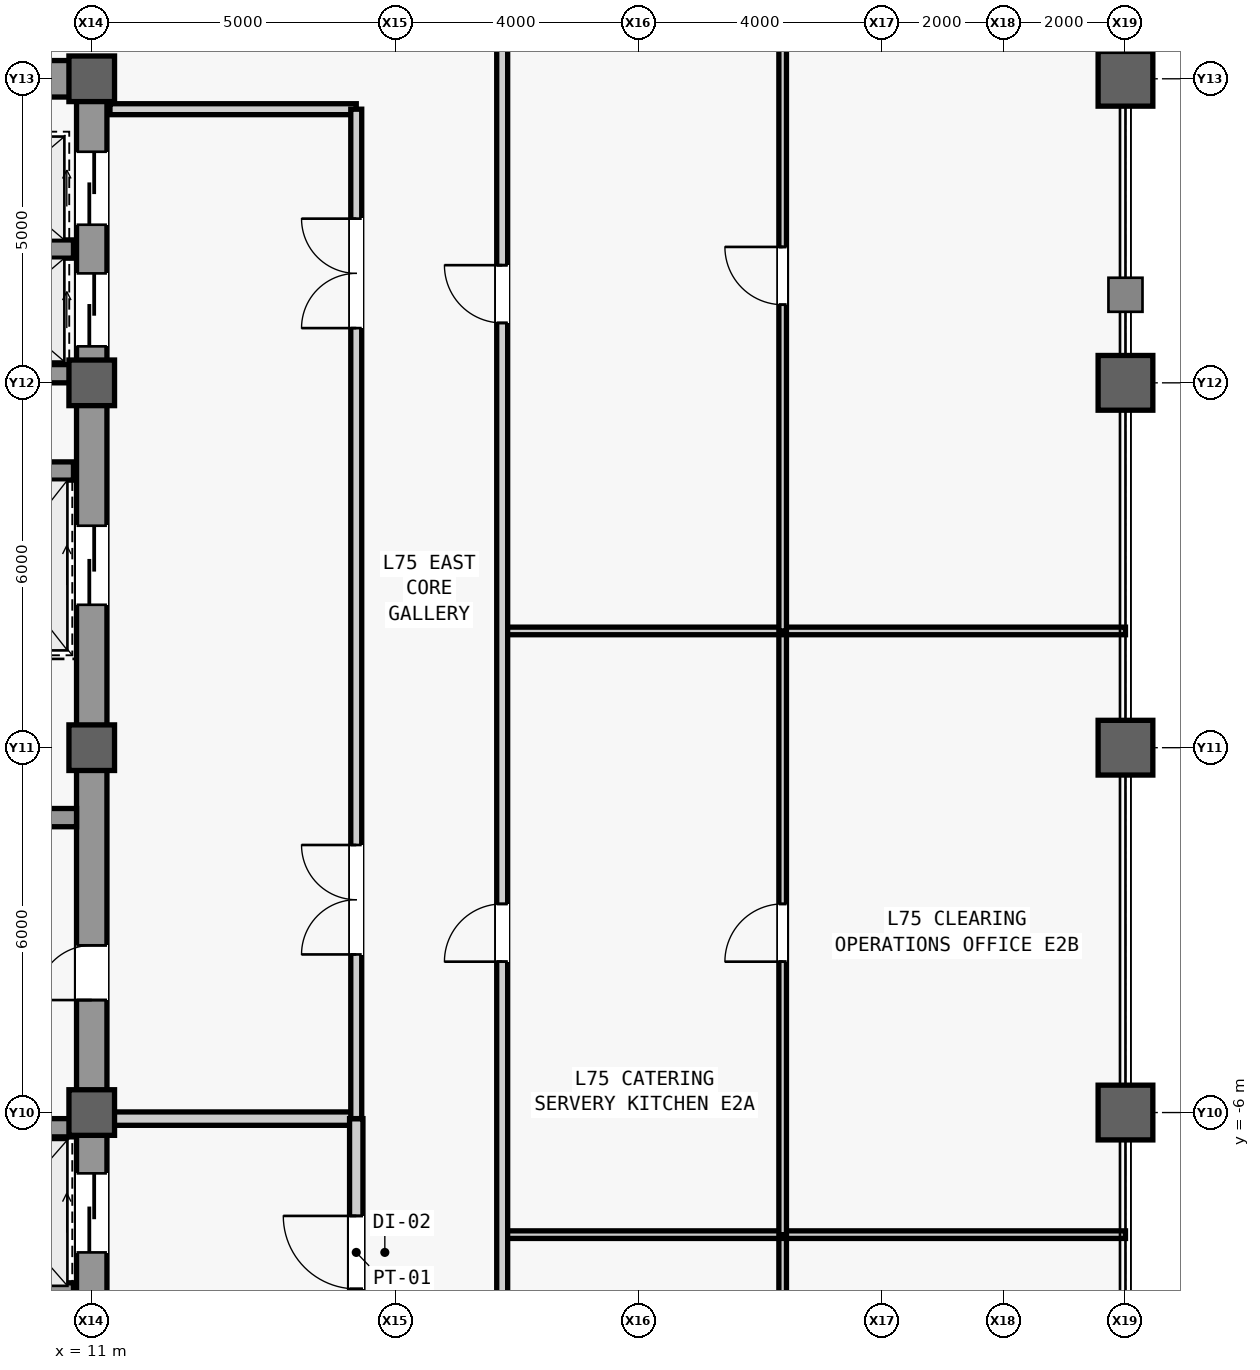
"""IFC4 building model, lengths in metres.
Left out: names, types, materials, properties, quantities, classifications, styles, units other than length and angle.
Written with IfcOpenShell. Run it as: python <this file> out.ifc"""

import sys

from ifc_helpers import new_model, si_unit, direction, frame, frame_2d, origin, origin_2d, place, context, subcontext, project, spatial, rectangle, hollow_rectangle, extrude, source, transform, mapped, element, fill, save


model = new_model("IFC4")
c1 = context("Model", 3, precision=1e-05, world=origin(), true_north=direction((0.0, 1.0)))
c2 = subcontext(c1, "Body", "Model", "MODEL_VIEW")
j1 = project(units=[si_unit("LENGTHUNIT", "METRE"), si_unit("PLANEANGLEUNIT", "RADIAN")], contexts=[c1])
p1 = place(None, origin())
s1 = spatial("IfcSite", under=j1, at=p1, CompositionType="ELEMENT")
p2 = place(p1, origin())
s2 = spatial("IfcBuilding", under=s1, at=p2, CompositionType="ELEMENT")
p3 = place(p2, frame((0.0, 0.0, 317.5)))
s3 = spatial("IfcBuildingStorey", under=s2, at=p3, CompositionType="ELEMENT", Elevation=317.5)
m1 = source(origin(), c2, "Body", "SweptSolid", [
    extrude(rectangle(XDim=22.0, YDim=0.5, at=frame_2d((11.0, 0.0))), origin(), (0.0, 0.0, 1.0), 3.78),
])
p4 = place(p3, frame((11.0, -11.0, 0.0), z_axis=(0.0, 0.0, 1.0), x_axis=(0.0, 1.0, 0.0)))
e1 = element("IfcWall", 1, at=p4, inside=s3, PredefinedType="SHEAR", context=c2, shape_type="MappedRepresentation", body=[
    mapped(m1, transform((0.0, 0.0, 0.0), scale=1.0)),
])
m2 = source(origin(), c2, "Body", "SweptSolid", [
    extrude(rectangle(XDim=1.1, YDim=2.2, at=frame_2d((0.55, 1.1))), frame((0.0, 0.26, 0.0), z_axis=(0.0, -1.0, 0.0), x_axis=(1.0, 0.0, 0.0)), (0.0, 0.0, 1.0), 0.52),
])
p5 = place(p4, frame((0.8, 0.0, 0.0)))
e2 = element("IfcOpeningElement", 2, at=p5, cuts=e1, PredefinedType="OPENING", context=c2, shape_type="MappedRepresentation", body=[
    mapped(m2, transform((0.0, 0.0, 0.0), scale=1.0)),
])
m3 = source(origin(), c2, "Body", "SweptSolid", [
    extrude(rectangle(XDim=0.9, YDim=2.15, at=frame_2d((0.45, 1.075))), frame((0.0, 0.26, 0.0), z_axis=(0.0, -1.0, 0.0), x_axis=(1.0, 0.0, 0.0)), (0.0, 0.0, 1.0), 0.52),
])
p6 = place(p4, frame((6.85, 0.0, 0.0)))
e3 = element("IfcOpeningElement", 3, at=p6, cuts=e1, PredefinedType="OPENING", context=c2, shape_type="MappedRepresentation", body=[
    mapped(m3, transform((0.0, 0.0, 0.0), scale=1.0)),
])
m4 = source(origin(), c2, "Body", "SweptSolid", [
    extrude(rectangle(XDim=1.2, YDim=2.3, at=frame_2d((0.6, 1.15))), frame((0.0, 0.26, 0.0), z_axis=(0.0, -1.0, 0.0), x_axis=(1.0, 0.0, 0.0)), (0.0, 0.0, 1.0), 0.52),
])
p7 = place(p4, frame((17.6, 0.0, 0.0)))
e4 = element("IfcOpeningElement", 4, at=p7, cuts=e1, PredefinedType="OPENING", context=c2, shape_type="MappedRepresentation", body=[
    mapped(m4, transform((0.0, 0.0, 0.0), scale=1.0)),
])
p8 = place(p4, frame((19.6, 0.0, 0.0)))
e5 = element("IfcOpeningElement", 5, at=p8, cuts=e1, PredefinedType="OPENING", context=c2, shape_type="MappedRepresentation", body=[
    mapped(m4, transform((0.0, 0.0, 0.0), scale=1.0)),
])
m5 = source(origin(), c2, "Body", "SweptSolid", [
    extrude(rectangle(XDim=1.3, YDim=2.3, at=frame_2d((0.65, 1.15))), frame((0.0, 0.26, 0.0), z_axis=(0.0, -1.0, 0.0), x_axis=(1.0, 0.0, 0.0)), (0.0, 0.0, 1.0), 0.52),
])
p9 = place(p4, frame((2.7, 0.0, 0.0)))
e6 = element("IfcOpeningElement", 6, at=p9, cuts=e1, PredefinedType="OPENING", context=c2, shape_type="MappedRepresentation", body=[
    mapped(m5, transform((0.0, 0.0, 0.0), scale=1.0)),
])
p10 = place(p4, frame((13.35, 0.0, 0.0)))
e7 = element("IfcOpeningElement", 7, at=p10, cuts=e1, PredefinedType="OPENING", context=c2, shape_type="MappedRepresentation", body=[
    mapped(m5, transform((0.0, 0.0, 0.0), scale=1.0)),
])
m6 = source(origin(), c2, "Body", "SweptSolid", [
    extrude(rectangle(XDim=5.9, YDim=0.6, at=frame_2d((2.95, 0.0))), origin(), (0.0, 0.0, 1.0), 3.78),
])
p11 = place(p3, frame((4.85, 11.0, 0.0), z_axis=(0.0, 0.0, 1.0), x_axis=(1.0, 0.0, 0.0)))
e8 = element("IfcWall", 8, at=p11, inside=s3, PredefinedType="SHEAR", context=c2, shape_type="MappedRepresentation", body=[
    mapped(m6, transform((0.0, 0.0, 0.0), scale=1.0)),
])
m7 = source(origin(), c2, "Body", "SweptSolid", [
    extrude(rectangle(XDim=1.05, YDim=2.2, at=frame_2d((0.525, 1.1))), frame((0.0, 0.31, 0.0), z_axis=(0.0, -1.0, 0.0), x_axis=(1.0, 0.0, 0.0)), (0.0, 0.0, 1.0), 0.62),
])
p12 = place(p11, frame((1.375, 0.0, 0.0)))
e9 = element("IfcOpeningElement", 9, at=p12, cuts=e8, PredefinedType="OPENING", context=c2, shape_type="MappedRepresentation", body=[
    mapped(m7, transform((0.0, 0.0, 0.0), scale=1.0)),
])
m8 = source(origin(), c2, "Body", "SweptSolid", [
    extrude(rectangle(XDim=5.65, YDim=0.3, at=frame_2d((2.825, 0.0))), origin(), (0.0, 0.0, 1.0), 3.78),
])
p13 = place(p3, frame((5.1, -1.15, 0.0), z_axis=(0.0, 0.0, 1.0), x_axis=(1.0, 0.0, 0.0)))
e10 = element("IfcWall", 10, at=p13, inside=s3, PredefinedType="SHEAR", context=c2, shape_type="MappedRepresentation", body=[
    mapped(m8, transform((0.0, 0.0, 0.0), scale=1.0)),
])
m9 = source(origin(), c2, "Body", "SweptSolid", [
    extrude(rectangle(XDim=0.75, YDim=0.75, at=origin_2d()), origin(), (0.0, 0.0, 1.0), 4.0),
])
for number, where, z_axis, x_axis in (
    (11, (11.0, -6.0, 0.0), (0.0, 0.0, 1.0), (1.0, 0.0, 0.0)),
    (12, (11.0, 0.0, 0.0), (0.0, 0.0, 1.0), (1.0, 0.0, 0.0)),
    (13, (11.0, 6.0, 0.0), (0.0, 0.0, 1.0), (1.0, 0.0, 0.0)),
    (14, (11.0, 11.0, 0.0), (0.0, 0.0, 1.0), (1.0, 0.0, 0.0)),
):
    element("IfcColumn", number, at=place(p3, frame(where, z_axis=z_axis, x_axis=x_axis)), inside=s3, PredefinedType="COLUMN", context=c2, shape_type="MappedRepresentation", body=[
        mapped(m9, transform((0.0, 0.0, 0.0), scale=1.0)),
    ])
m10 = source(origin(), c2, "Body", "SweptSolid", [
    extrude(hollow_rectangle(XDim=0.9, YDim=0.9, WallThickness=0.05, at=origin_2d()), origin(), (0.0, 0.0, 1.0), 4.0),
])
for number, where, z_axis, x_axis in (
    (15, (28.0, -6.0, 0.0), (0.0, 0.0, 1.0), (1.0, 0.0, 0.0)),
    (16, (28.0, 0.0, 0.0), (0.0, 0.0, 1.0), (1.0, 0.0, 0.0)),
    (17, (28.0, 6.0, 0.0), (0.0, 0.0, 1.0), (1.0, 0.0, 0.0)),
    (18, (28.0, 11.0, 0.0), (0.0, 0.0, 1.0), (1.0, 0.0, 0.0)),
):
    element("IfcColumn", number, at=place(p3, frame(where, z_axis=z_axis, x_axis=x_axis)), inside=s3, PredefinedType="COLUMN", context=c2, shape_type="MappedRepresentation", body=[
        mapped(m10, transform((0.0, 0.0, 0.0), scale=1.0)),
    ])
m11 = source(origin(), c2, "Body", "SweptSolid", [
    extrude(rectangle(XDim=2.2, YDim=0.3, at=frame_2d((1.1, 0.0))), origin(), (0.0, 0.0, 1.0), 3.78),
])
for number, where, z_axis, x_axis in (
    (19, (8.5, -8.95, 0.0), (0.0, 0.0, 1.0), (1.0, 0.0, 0.0)),
    (20, (8.5, -6.25, 0.0), (0.0, 0.0, 1.0), (1.0, 0.0, 0.0)),
):
    element("IfcWall", number, at=place(p3, frame(where, z_axis=z_axis, x_axis=x_axis)), inside=s3, PredefinedType="SHEAR", context=c2, shape_type="MappedRepresentation", body=[
        mapped(m11, transform((0.0, 0.0, 0.0), scale=1.0)),
    ])
m12 = source(origin(), c2, "Body", "SweptSolid", [
    extrude(rectangle(XDim=2.3, YDim=0.3, at=frame_2d((1.15, 0.0))), origin(), (0.0, 0.0, 1.0), 3.78),
])
for number, where, z_axis, x_axis in (
    (21, (8.4, 4.55, 0.0), (0.0, 0.0, 1.0), (1.0, 0.0, 0.0)),
    (22, (8.4, 6.15, 0.0), (0.0, 0.0, 1.0), (1.0, 0.0, 0.0)),
    (23, (8.4, 8.2, 0.0), (0.0, 0.0, 1.0), (1.0, 0.0, 0.0)),
):
    element("IfcWall", number, at=place(p3, frame(where, z_axis=z_axis, x_axis=x_axis)), inside=s3, PredefinedType="SHEAR", context=c2, shape_type="MappedRepresentation", body=[
        mapped(m12, transform((0.0, 0.0, 0.0), scale=1.0)),
    ])
m13 = source(origin(), c2, "Body", "SweptSolid", [
    extrude(rectangle(XDim=4.05, YDim=0.22, at=frame_2d((2.025, 0.0))), origin(), (0.0, 0.0, 1.0), 3.085),
])
p14 = place(p3, frame((11.3, -6.1, 0.0), z_axis=(0.0, 0.0, 1.0), x_axis=(1.0, 0.0, 0.0)))
e24 = element("IfcWall", 24, at=p14, inside=s3, PredefinedType="PARTITIONING", context=c2, shape_type="MappedRepresentation", body=[
    mapped(m13, transform((0.0, 0.0, 0.0), scale=1.0)),
])
m14 = source(origin(), c2, "Body", "SweptSolid", [
    extrude(rectangle(XDim=4.4, YDim=0.22, at=frame_2d((2.2, 0.0))), origin(), (0.0, 0.0, 1.0), 3.78),
])
p15 = place(p3, frame((15.35, -10.5, 0.0), z_axis=(0.0, 0.0, 1.0), x_axis=(0.0, 1.0, 0.0)))
e25 = element("IfcWall", 25, at=p15, inside=s3, PredefinedType="PARTITIONING", context=c2, shape_type="MappedRepresentation", body=[
    mapped(m14, transform((0.0, 0.0, 0.0), scale=1.0)),
])
m15 = source(origin(), c2, "Body", "SweptSolid", [
    extrude(rectangle(XDim=1.2, YDim=2.2, at=frame_2d((0.6, 1.1))), frame((0.0, 0.12, 0.0), z_axis=(0.0, -1.0, 0.0), x_axis=(1.0, 0.0, 0.0)), (0.0, 0.0, 1.0), 0.24),
])
p16 = place(p15, frame((1.6, 0.0, 0.0)))
e26 = element("IfcOpeningElement", 26, at=p16, cuts=e25, PredefinedType="OPENING", context=c2, shape_type="MappedRepresentation", body=[
    mapped(m15, transform((0.0, 0.0, 0.0), scale=1.0)),
])
m16 = source(origin(), c2, "Body", "SweptSolid", [
    extrude(rectangle(XDim=4.05, YDim=0.18, at=frame_2d((2.025, 0.0))), origin(), (0.0, 0.0, 1.0), 3.78),
])
p17 = place(p3, frame((11.3, 10.5, 0.0), z_axis=(0.0, 0.0, 1.0), x_axis=(1.0, 0.0, 0.0)))
e27 = element("IfcWall", 27, at=p17, inside=s3, PredefinedType="PARTITIONING", context=c2, shape_type="MappedRepresentation", body=[
    mapped(m16, transform((0.0, 0.0, 0.0), scale=1.0)),
])
m17 = source(origin(), c2, "Body", "SweptSolid", [
    extrude(rectangle(XDim=16.6, YDim=0.18, at=frame_2d((8.3, 0.0))), origin(), (0.0, 0.0, 1.0), 3.78),
])
p18 = place(p3, frame((15.35, -6.1, 0.0), z_axis=(0.0, 0.0, 1.0), x_axis=(0.0, 1.0, 0.0)))
e28 = element("IfcWall", 28, at=p18, inside=s3, PredefinedType="PARTITIONING", context=c2, shape_type="MappedRepresentation", body=[
    mapped(m17, transform((0.0, 0.0, 0.0), scale=1.0)),
])
m18 = source(origin(), c2, "Body", "SweptSolid", [
    extrude(rectangle(XDim=1.8, YDim=2.25, at=frame_2d((0.9, 1.125))), frame((0.0, 0.1, 0.0), z_axis=(0.0, -1.0, 0.0), x_axis=(1.0, 0.0, 0.0)), (0.0, 0.0, 1.0), 0.2),
])
p19 = place(p18, frame((2.7, 0.0, 0.0)))
e29 = element("IfcOpeningElement", 29, at=p19, cuts=e28, PredefinedType="OPENING", context=c2, shape_type="MappedRepresentation", body=[
    mapped(m18, transform((0.0, 0.0, 0.0), scale=1.0)),
])
p20 = place(p18, frame((13.0, 0.0, 0.0)))
e30 = element("IfcOpeningElement", 30, at=p20, cuts=e28, PredefinedType="OPENING", context=c2, shape_type="MappedRepresentation", body=[
    mapped(m18, transform((0.0, 0.0, 0.0), scale=1.0)),
])
m19 = source(origin(), c2, "Body", "SweptSolid", [
    extrude(rectangle(XDim=9.992, YDim=0.125, at=frame_2d((4.996, 0.0))), origin(), (0.0, 0.0, 1.0), 3.164),
])
p21 = place(p3, frame((22.363, -18.0, 0.0), z_axis=(0.0, 0.0, 1.0), x_axis=(0.0, 1.0, 0.0)))
e31 = element("IfcWall", 31, at=p21, inside=s3, PredefinedType="PARTITIONING", context=c2, shape_type="MappedRepresentation", body=[
    mapped(m19, transform((0.0, 0.0, 0.0), scale=1.0)),
])
m20 = source(origin(), c2, "Body", "SweptSolid", [
    extrude(rectangle(XDim=0.95, YDim=2.15, at=frame_2d((0.475, 1.075))), frame((0.0, 0.073, 0.0), z_axis=(0.0, -1.0, 0.0), x_axis=(1.0, 0.0, 0.0)), (0.0, 0.0, 1.0), 0.145),
])
p22 = place(p21, frame((5.721, 0.0, 0.0)))
e32 = element("IfcOpeningElement", 32, at=p22, cuts=e31, PredefinedType="OPENING", context=c2, shape_type="MappedRepresentation", body=[
    mapped(m20, transform((0.0, 0.0, 0.0), scale=1.0)),
])
m21 = source(origin(), c2, "Body", "SweptSolid", [
    extrude(rectangle(XDim=10.25, YDim=0.125, at=frame_2d((5.125, 0.0))), origin(), (0.0, 0.0, 1.0), 3.78),
])
p23 = place(p3, frame((17.75, -8.008, 0.0), z_axis=(0.0, 0.0, 1.0), x_axis=(1.0, 0.0, 0.0)))
e33 = element("IfcWall", 33, at=p23, inside=s3, PredefinedType="PARTITIONING", context=c2, shape_type="MappedRepresentation", body=[
    mapped(m21, transform((0.0, 0.0, 0.0), scale=1.0)),
])
m22 = source(origin(), c2, "Body", "SweptSolid", [
    extrude(rectangle(XDim=9.928, YDim=0.125, at=frame_2d((4.964, 0.0))), origin(), (0.0, 0.0, 1.0), 3.78),
])
p24 = place(p3, frame((22.363, -8.008, 0.0), z_axis=(0.0, 0.0, 1.0), x_axis=(0.0, 1.0, 0.0)))
e34 = element("IfcWall", 34, at=p24, inside=s3, PredefinedType="PARTITIONING", context=c2, shape_type="MappedRepresentation", body=[
    mapped(m22, transform((0.0, 0.0, 0.0), scale=1.0)),
])
p25 = place(p24, frame((4.489, 0.0, 0.0)))
e35 = element("IfcOpeningElement", 35, at=p25, cuts=e34, PredefinedType="OPENING", context=c2, shape_type="MappedRepresentation", body=[
    mapped(m20, transform((0.0, 0.0, 0.0), scale=1.0)),
])
p26 = place(p3, frame((17.75, 1.92, 0.0), z_axis=(0.0, 0.0, 1.0), x_axis=(1.0, 0.0, 0.0)))
e36 = element("IfcWall", 36, at=p26, inside=s3, PredefinedType="PARTITIONING", context=c2, shape_type="MappedRepresentation", body=[
    mapped(m21, transform((0.0, 0.0, 0.0), scale=1.0)),
])
m23 = source(origin(), c2, "Body", "SweptSolid", [
    extrude(rectangle(XDim=20.58, YDim=0.125, at=frame_2d((10.29, 0.0))), origin(), (0.0, 0.0, 1.0), 3.164),
])
p27 = place(p3, frame((22.363, 1.92, 0.0), z_axis=(0.0, 0.0, 1.0), x_axis=(0.0, 1.0, 0.0)))
e37 = element("IfcWall", 37, at=p27, inside=s3, PredefinedType="PARTITIONING", context=c2, shape_type="MappedRepresentation", body=[
    mapped(m23, transform((0.0, 0.0, 0.0), scale=1.0)),
])
p28 = place(p27, frame((5.365, 0.0, 0.0)))
e38 = element("IfcOpeningElement", 38, at=p28, cuts=e37, PredefinedType="OPENING", context=c2, shape_type="MappedRepresentation", body=[
    mapped(m20, transform((0.0, 0.0, 0.0), scale=1.0)),
])
m24 = source(origin(), c2, "Body", "SweptSolid", [
    extrude(rectangle(XDim=40.5, YDim=0.18, at=frame_2d((20.25, 0.0))), origin(), (0.0, 0.0, 1.0), 3.78),
])
p29 = place(p3, frame((17.75, -18.0, 0.0), z_axis=(0.0, 0.0, 1.0), x_axis=(0.0, 1.0, 0.0)))
e39 = element("IfcWall", 39, at=p29, inside=s3, PredefinedType="PARTITIONING", context=c2, shape_type="MappedRepresentation", body=[
    mapped(m24, transform((0.0, 0.0, 0.0), scale=1.0)),
])
m25 = source(origin(), c2, "Body", "SweptSolid", [
    extrude(rectangle(XDim=0.95, YDim=2.15, at=frame_2d((0.475, 1.075))), frame((0.0, 0.1, 0.0), z_axis=(0.0, -1.0, 0.0), x_axis=(1.0, 0.0, 0.0)), (0.0, 0.0, 1.0), 0.2),
])
p30 = place(p29, frame((6.021, 0.0, 0.0)))
e40 = element("IfcOpeningElement", 40, at=p30, cuts=e39, PredefinedType="OPENING", context=c2, shape_type="MappedRepresentation", body=[
    mapped(m25, transform((0.0, 0.0, 0.0), scale=1.0)),
])
p31 = place(p29, frame((14.481, 0.0, 0.0)))
e41 = element("IfcOpeningElement", 41, at=p31, cuts=e39, PredefinedType="OPENING", context=c2, shape_type="MappedRepresentation", body=[
    mapped(m25, transform((0.0, 0.0, 0.0), scale=1.0)),
])
p32 = place(p29, frame((24.985, 0.0, 0.0)))
e42 = element("IfcOpeningElement", 42, at=p32, cuts=e39, PredefinedType="OPENING", context=c2, shape_type="MappedRepresentation", body=[
    mapped(m25, transform((0.0, 0.0, 0.0), scale=1.0)),
])
m26 = source(origin(), c2, "Body", "SweptSolid", [
    extrude(rectangle(XDim=0.9, YDim=2.15, at=frame_2d((0.45, 1.075))), frame((0.0, 0.025, 0.0), z_axis=(0.0, -1.0, 0.0), x_axis=(1.0, 0.0, 0.0)), (0.0, 0.0, 1.0), 0.05),
])
p33 = place(p6, origin())
e43 = element("IfcDoor", 43, at=p33, inside=s3, OperationType="SINGLE_SWING_LEFT", PredefinedType="DOOR", context=c2, shape_type="MappedRepresentation", body=[
    mapped(m26, transform((0.0, 0.0, 0.0), scale=1.0)),
])
fill(e3, e43)
m27 = source(origin(), c2, "Body", "SweptSolid", [
    extrude(rectangle(XDim=1.2, YDim=2.2, at=frame_2d((0.6, 1.1))), frame((0.0, 0.025, 0.0), z_axis=(0.0, -1.0, 0.0), x_axis=(1.0, 0.0, 0.0)), (0.0, 0.0, 1.0), 0.05),
])
p34 = place(p16, origin())
e44 = element("IfcDoor", 44, at=p34, inside=s3, OperationType="SINGLE_SWING_RIGHT", PredefinedType="DOOR", context=c2, shape_type="MappedRepresentation", body=[
    mapped(m27, transform((0.0, 0.0, 0.0), scale=1.0)),
])
fill(e26, e44)
m28 = source(origin(), c2, "Body", "SweptSolid", [
    extrude(rectangle(XDim=1.8, YDim=2.25, at=frame_2d((0.9, 1.125))), frame((0.0, 0.025, 0.0), z_axis=(0.0, -1.0, 0.0), x_axis=(1.0, 0.0, 0.0)), (0.0, 0.0, 1.0), 0.05),
])
p35 = place(p19, origin())
e45 = element("IfcDoor", 45, at=p35, inside=s3, OperationType="SINGLE_SWING_RIGHT", PredefinedType="DOOR", context=c2, shape_type="MappedRepresentation", body=[
    mapped(m28, transform((0.0, 0.0, 0.0), scale=1.0)),
])
fill(e29, e45)
p36 = place(p20, origin())
e46 = element("IfcDoor", 46, at=p36, inside=s3, OperationType="SINGLE_SWING_LEFT", PredefinedType="DOOR", context=c2, shape_type="MappedRepresentation", body=[
    mapped(m28, transform((0.0, 0.0, 0.0), scale=1.0)),
])
fill(e30, e46)
m29 = source(origin(), c2, "Body", "SweptSolid", [
    extrude(rectangle(XDim=0.95, YDim=2.15, at=frame_2d((0.475, 1.075))), frame((0.0, 0.025, 0.0), z_axis=(0.0, -1.0, 0.0), x_axis=(1.0, 0.0, 0.0)), (0.0, 0.0, 1.0), 0.05),
])
p37 = place(p25, origin())
e47 = element("IfcDoor", 47, at=p37, inside=s3, OperationType="SINGLE_SWING_LEFT", PredefinedType="DOOR", context=c2, shape_type="MappedRepresentation", body=[
    mapped(m29, transform((0.0, 0.0, 0.0), scale=1.0)),
])
fill(e35, e47)
p38 = place(p28, origin())
e48 = element("IfcDoor", 48, at=p38, inside=s3, OperationType="SINGLE_SWING_RIGHT", PredefinedType="DOOR", context=c2, shape_type="MappedRepresentation", body=[
    mapped(m29, transform((0.0, 0.0, 0.0), scale=1.0)),
])
fill(e38, e48)
p39 = place(p31, origin())
e49 = element("IfcDoor", 49, at=p39, inside=s3, OperationType="SINGLE_SWING_LEFT", PredefinedType="DOOR", context=c2, shape_type="MappedRepresentation", body=[
    mapped(m29, transform((0.0, 0.0, 0.0), scale=1.0)),
])
fill(e41, e49)
p40 = place(p32, origin())
e50 = element("IfcDoor", 50, at=p40, inside=s3, OperationType="SINGLE_SWING_RIGHT", PredefinedType="DOOR", context=c2, shape_type="MappedRepresentation", body=[
    mapped(m29, transform((0.0, 0.0, 0.0), scale=1.0)),
])
fill(e42, e50)
m30 = source(origin(), c2, "Body", "SweptSolid", [
    extrude(rectangle(XDim=1.2, YDim=2.3, at=frame_2d((0.6, 1.15))), frame((0.0, 0.025, 0.0), z_axis=(0.0, -1.0, 0.0), x_axis=(1.0, 0.0, 0.0)), (0.0, 0.0, 1.0), 0.05),
])
p41 = place(p7, origin())
e51 = element("IfcDoor", 51, at=p41, inside=s3, OperationType="SLIDING_TO_LEFT", PredefinedType="DOOR", context=c2, shape_type="MappedRepresentation", body=[
    mapped(m30, transform((0.0, 0.0, 0.0), scale=1.0)),
])
fill(e4, e51)
p42 = place(p8, origin())
e52 = element("IfcDoor", 52, at=p42, inside=s3, OperationType="SLIDING_TO_LEFT", PredefinedType="DOOR", context=c2, shape_type="MappedRepresentation", body=[
    mapped(m30, transform((0.0, 0.0, 0.0), scale=1.0)),
])
fill(e5, e52)
m31 = source(origin(), c2, "Body", "SweptSolid", [
    extrude(rectangle(XDim=1.3, YDim=2.3, at=frame_2d((0.65, 1.15))), frame((0.0, 0.025, 0.0), z_axis=(0.0, -1.0, 0.0), x_axis=(1.0, 0.0, 0.0)), (0.0, 0.0, 1.0), 0.05),
])
p43 = place(p9, origin())
e53 = element("IfcDoor", 53, at=p43, inside=s3, OperationType="SLIDING_TO_LEFT", PredefinedType="DOOR", context=c2, shape_type="MappedRepresentation", body=[
    mapped(m31, transform((0.0, 0.0, 0.0), scale=1.0)),
])
fill(e6, e53)
p44 = place(p10, origin())
e54 = element("IfcDoor", 54, at=p44, inside=s3, OperationType="SLIDING_TO_LEFT", PredefinedType="DOOR", context=c2, shape_type="MappedRepresentation", body=[
    mapped(m31, transform((0.0, 0.0, 0.0), scale=1.0)),
])
fill(e7, e54)
save(model, sys.argv[1])
